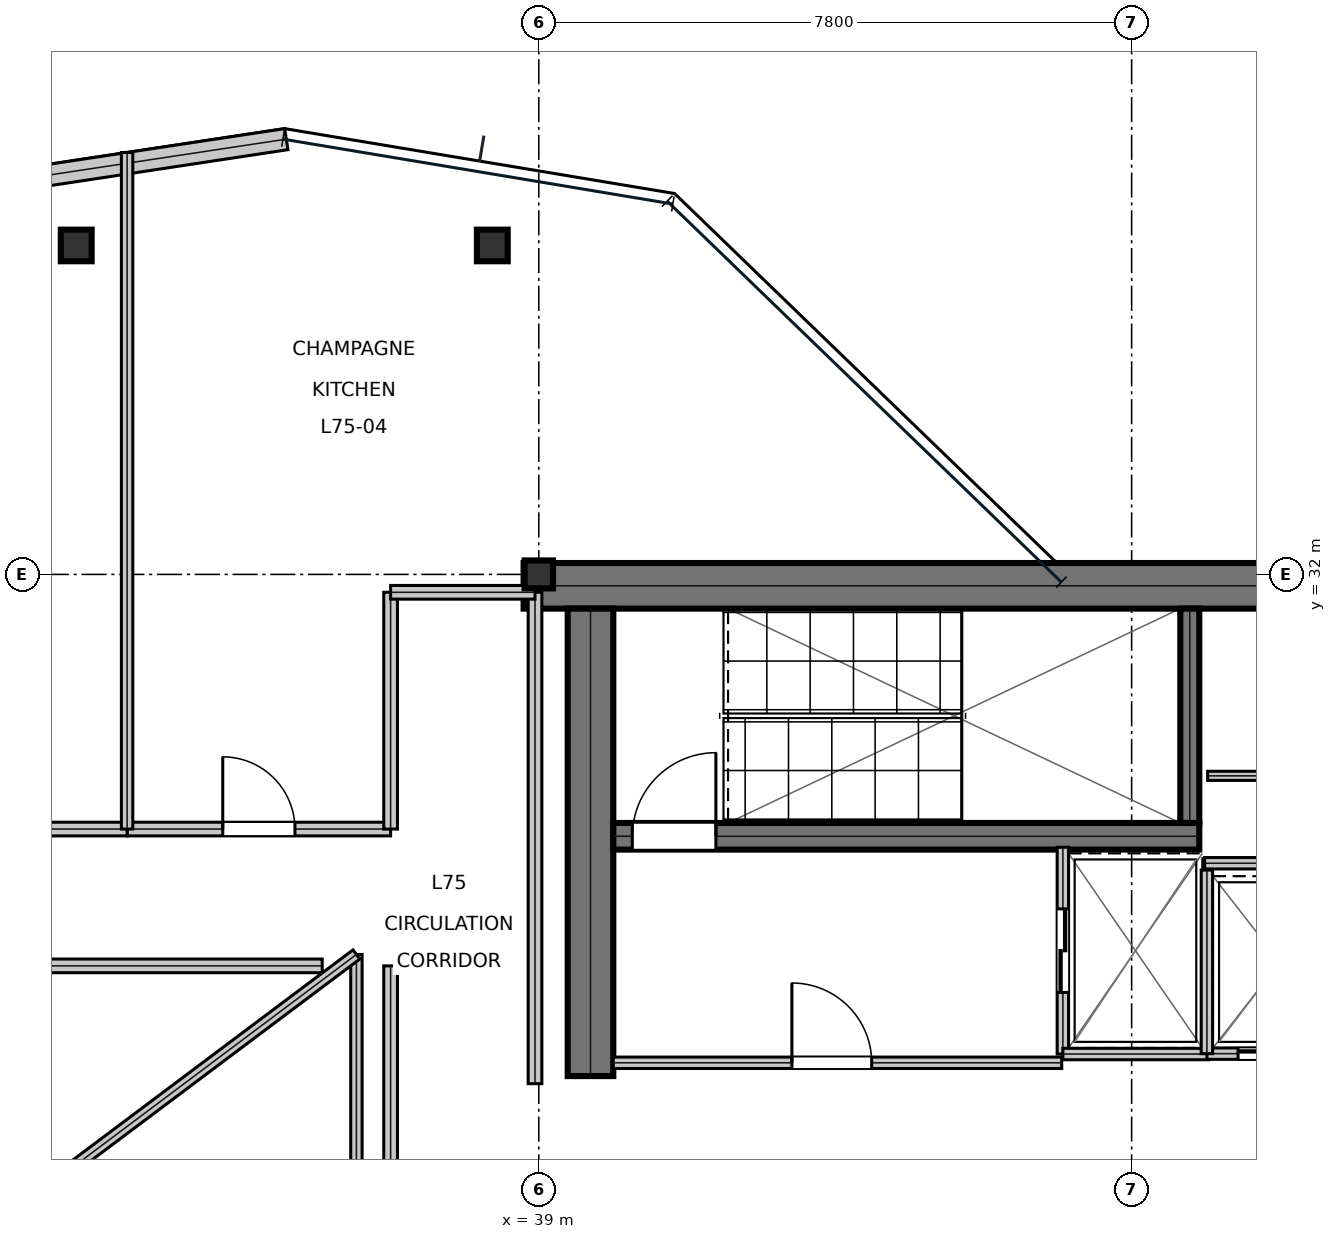
"""IFC4 building model, lengths in metres.
Left out: names, types, materials, properties, quantities, classifications, styles, units other than length and angle.
Written with IfcOpenShell. Run it as: python <this file> out.ifc"""

import sys

from ifc_helpers import new_model, si_unit, direction, frame, frame_2d, origin, origin_2d, place, context, subcontext, project, spatial, rectangle, i_section, extrude, element, fill, save


model = new_model("IFC4")
c1 = context("Model", 3, precision=1e-05, world=origin(), true_north=direction((0.0, 1.0)))
c2 = subcontext(c1, "Body", "Model", "MODEL_VIEW")
j1 = project(units=[si_unit("LENGTHUNIT", "METRE"), si_unit("PLANEANGLEUNIT", "RADIAN")], contexts=[c1])
p1 = place(None, origin())
s1 = spatial("IfcSite", under=j1, at=p1, CompositionType="ELEMENT")
p2 = place(p1, origin())
s2 = spatial("IfcBuilding", under=s1, at=p2, CompositionType="ELEMENT")
p3 = place(p2, frame((0.0, 0.0, 319.5)))
s3 = spatial("IfcBuildingStorey", under=s2, at=p3, CompositionType="ELEMENT", Elevation=319.5)
p4 = place(p3, frame((38.8, 31.85, 0.0), z_axis=(0.0, 0.0, 1.0), x_axis=(1.0, 0.0, 0.0)))
e1 = element("IfcWall", 1, at=p4, inside=s3, PredefinedType="SHEAR", context=c2, shape_type="SweptSolid", body=[
    extrude(rectangle(XDim=16.0, YDim=0.6, at=frame_2d((8.0, 0.0))), origin(), (0.0, 0.0, 1.0), 3.81),
])
p5 = place(p3, frame((39.68, 25.4, 0.0), z_axis=(0.0, 0.0, 1.0), x_axis=(0.0, 1.0, 0.0)))
e2 = element("IfcWall", 2, at=p5, inside=s3, PredefinedType="SHEAR", context=c2, shape_type="SweptSolid", body=[
    extrude(rectangle(XDim=6.15, YDim=0.6, at=frame_2d((3.075, 0.0))), origin(), (0.0, 0.0, 1.0), 3.81),
])
p6 = place(p3, frame((39.98, 28.555, 0.0), z_axis=(0.0, 0.0, 1.0), x_axis=(1.0, 0.0, 0.0)))
e3 = element("IfcWall", 3, at=p6, inside=s3, PredefinedType="SHEAR", context=c2, shape_type="SweptSolid", body=[
    extrude(rectangle(XDim=7.71, YDim=0.35, at=frame_2d((3.855, 0.0))), origin(), (0.0, 0.0, 1.0), 3.81),
])
p7 = place(p6, frame((0.25, 0.0, 0.0)))
e4 = element("IfcOpeningElement", 4, at=p7, cuts=e3, PredefinedType="OPENING", context=c2, shape_type="SweptSolid", body=[
    extrude(rectangle(XDim=1.1, YDim=2.15, at=frame_2d((0.55, 1.075))), frame((0.0, 0.185, 0.0), z_axis=(0.0, -1.0, 0.0), x_axis=(1.0, 0.0, 0.0)), (0.0, 0.0, 1.0), 0.37),
])
p8 = place(p3, frame((47.565, 28.73, 0.0), z_axis=(0.0, 0.0, 1.0), x_axis=(0.0, 1.0, 0.0)))
e5 = element("IfcWall", 5, at=p8, inside=s3, PredefinedType="SHEAR", context=c2, shape_type="SweptSolid", body=[
    extrude(rectangle(XDim=2.82, YDim=0.25, at=frame_2d((1.41, 0.0))), origin(), (0.0, 0.0, 1.0), 3.81),
])
p9 = place(p3, frame((39.0, 32.0, 0.0), z_axis=(0.0, 0.0, 1.0), x_axis=(1.0, 0.0, 0.0)))
e6 = element("IfcColumn", 6, at=p9, inside=s3, PredefinedType="COLUMN", context=c2, shape_type="SweptSolid", body=[
    extrude(i_section(OverallWidth=0.373, OverallDepth=0.368, WebThickness=0.015, FlangeThickness=0.024, at=origin_2d()), origin(), (0.0, 0.0, 1.0), 4.044),
])
p10 = place(p3, frame((32.914, 36.328, 0.016), z_axis=(0.011176767786, -0.023872118153, 0.999652540554), x_axis=(0.905652571216, 0.424020542249, 0.0)))
e7 = element("IfcColumn", 7, at=p10, inside=s3, PredefinedType="COLUMN", context=c2, shape_type="SweptSolid", body=[
    extrude(i_section(OverallWidth=0.406, OverallDepth=0.416, WebThickness=0.03, FlangeThickness=0.048, at=origin_2d()), origin(), (0.0, 0.0, 1.0), 4.019),
])
p11 = place(p3, frame((38.388, 36.328, 0.016), z_axis=(-0.003948530561, -0.02387342324, 0.999707191516), x_axis=(0.986596715682, -0.163177573841, 0.0)))
e8 = element("IfcColumn", 8, at=p11, inside=s3, PredefinedType="COLUMN", context=c2, shape_type="SweptSolid", body=[
    extrude(i_section(OverallWidth=0.406, OverallDepth=0.416, WebThickness=0.03, FlangeThickness=0.048, at=origin_2d()), origin(), (0.0, 0.0, 1.0), 4.019),
])
p12 = place(p3, frame((35.678, 37.726, 0.0), z_axis=(0.0, 0.0, 1.0), x_axis=(-0.988753702072, -0.149553056265, 0.0)))
e9 = element("IfcWall", 9, at=p12, inside=s3, PredefinedType="STANDARD", context=c2, shape_type="SweptSolid", body=[
    extrude(rectangle(XDim=5.188, YDim=0.28, at=frame_2d((2.594, 0.0))), origin(), (0.0, 0.0, 1.0), 3.81),
])
p13 = place(p3, frame((39.98, 25.575, 0.0), z_axis=(0.0, 0.0, 1.0), x_axis=(1.0, 0.0, 0.0)))
e10 = element("IfcWall", 10, at=p13, inside=s3, PredefinedType="PARTITIONING", context=c2, shape_type="SweptSolid", body=[
    extrude(rectangle(XDim=5.9, YDim=0.15, at=frame_2d((2.95, 0.0))), origin(), (0.0, 0.0, 1.0), 3.81),
])
p14 = place(p13, frame((2.35, 0.0, 0.0)))
e11 = element("IfcOpeningElement", 11, at=p14, cuts=e10, PredefinedType="OPENING", context=c2, shape_type="SweptSolid", body=[
    extrude(rectangle(XDim=1.05, YDim=2.15, at=frame_2d((0.525, 1.075))), frame((0.0, 0.085, 0.0), z_axis=(0.0, -1.0, 0.0), x_axis=(1.0, 0.0, 0.0)), (0.0, 0.0, 1.0), 0.17),
])
p15 = place(p3, frame((45.895, 25.69, 0.0), z_axis=(0.0, 0.0, 1.0), x_axis=(0.0, 1.0, 0.0)))
e12 = element("IfcWall", 12, at=p15, inside=s3, PredefinedType="PARTITIONING", context=c2, shape_type="SweptSolid", body=[
    extrude(rectangle(XDim=2.72, YDim=0.15, at=frame_2d((1.36, 0.0))), origin(), (0.0, 0.0, 1.0), 3.81),
])
p16 = place(p15, frame((0.81, 0.0, 0.0)))
e13 = element("IfcOpeningElement", 13, at=p16, cuts=e12, PredefinedType="OPENING", context=c2, shape_type="SweptSolid", body=[
    extrude(rectangle(XDim=1.1, YDim=2.15, at=frame_2d((0.55, 1.075))), frame((0.0, 0.085, 0.0), z_axis=(0.0, -1.0, 0.0), x_axis=(1.0, 0.0, 0.0)), (0.0, 0.0, 1.0), 0.17),
])
p17 = place(p3, frame((45.895, 25.69, 0.0), z_axis=(0.0, 0.0, 1.0), x_axis=(1.0, 0.0, 0.0)))
e14 = element("IfcWall", 14, at=p17, inside=s3, PredefinedType="PARTITIONING", context=c2, shape_type="SweptSolid", body=[
    extrude(rectangle(XDim=1.915, YDim=0.15, at=frame_2d((0.958, 0.0))), origin(), (0.0, 0.0, 1.0), 3.81),
])
p18 = place(p3, frame((47.79, 25.695, 0.0), z_axis=(0.0, 0.0, 1.0), x_axis=(1.0, 0.0, 0.0)))
e15 = element("IfcWall", 15, at=p18, inside=s3, PredefinedType="PARTITIONING", context=c2, shape_type="SweptSolid", body=[
    extrude(rectangle(XDim=1.92, YDim=0.15, at=frame_2d((0.96, 0.0))), origin(), (0.0, 0.0, 1.0), 3.81),
])
p19 = place(p18, frame((0.41, 0.0, 0.0)))
e16 = element("IfcOpeningElement", 16, at=p19, cuts=e15, PredefinedType="OPENING", context=c2, shape_type="SweptSolid", body=[
    extrude(rectangle(XDim=1.1, YDim=2.15, at=frame_2d((0.55, 1.075))), frame((0.0, 0.085, 0.0), z_axis=(0.0, -1.0, 0.0), x_axis=(1.0, 0.0, 0.0)), (0.0, 0.0, 1.0), 0.17),
])
p20 = place(p3, frame((47.79, 25.695, 0.0), z_axis=(0.0, 0.0, 1.0), x_axis=(0.0, 1.0, 0.0)))
e17 = element("IfcWall", 17, at=p20, inside=s3, PredefinedType="PARTITIONING", context=c2, shape_type="SweptSolid", body=[
    extrude(rectangle(XDim=2.415, YDim=0.15, at=frame_2d((1.208, 0.0))), origin(), (0.0, 0.0, 1.0), 3.81),
])
p21 = place(p3, frame((47.76, 28.2, 0.0), z_axis=(0.0, 0.0, 1.0), x_axis=(1.0, 0.0, 0.0)))
e18 = element("IfcWall", 18, at=p21, inside=s3, PredefinedType="PARTITIONING", context=c2, shape_type="SweptSolid", body=[
    extrude(rectangle(XDim=2.04, YDim=0.15, at=frame_2d((1.02, 0.0))), origin(), (0.0, 0.0, 1.0), 3.81),
])
p22 = place(p3, frame((47.8, 29.35, 0.0), z_axis=(0.0, 0.0, 1.0), x_axis=(1.0, 0.0, 0.0)))
e19 = element("IfcWall", 19, at=p22, inside=s3, PredefinedType="PARTITIONING", context=c2, shape_type="SweptSolid", body=[
    extrude(rectangle(XDim=5.86, YDim=0.12, at=frame_2d((2.93, 0.0))), origin(), (0.0, 0.0, 1.0), 3.81),
])
p23 = place(p22, frame((2.6, 0.0, 0.0)))
e20 = element("IfcOpeningElement", 20, at=p23, cuts=e19, PredefinedType="OPENING", context=c2, shape_type="SweptSolid", body=[
    extrude(rectangle(XDim=0.85, YDim=2.15, at=frame_2d((0.425, 1.075))), frame((0.0, 0.07, 0.0), z_axis=(0.0, -1.0, 0.0), x_axis=(1.0, 0.0, 0.0)), (0.0, 0.0, 1.0), 0.14),
])
p24 = place(p3, frame((37.05, 16.235, 0.0), z_axis=(0.0, 0.0, 1.0), x_axis=(0.0, 1.0, 0.0)))
e21 = element("IfcWall", 21, at=p24, inside=s3, PredefinedType="SOLIDWALL", context=c2, shape_type="SweptSolid", body=[
    extrude(rectangle(XDim=10.615, YDim=0.18, at=frame_2d((5.308, 0.0))), origin(), (0.0, 0.0, 1.0), 2.886),
])
p25 = place(p24, frame((2.852, 0.0, 0.0)))
e22 = element("IfcOpeningElement", 22, at=p25, cuts=e21, PredefinedType="OPENING", context=c2, shape_type="SweptSolid", body=[
    extrude(rectangle(XDim=0.95, YDim=2.15, at=frame_2d((0.475, 1.075))), frame((0.0, 0.1, 0.0), z_axis=(0.0, -1.0, 0.0), x_axis=(1.0, 0.0, 0.0)), (0.0, 0.0, 1.0), 0.2),
])
p26 = place(p3, frame((33.583, 28.65, 0.0), z_axis=(0.0, 0.0, 1.0), x_axis=(1.0, 0.0, 0.0)))
e23 = element("IfcWall", 23, at=p26, inside=s3, PredefinedType="SOLIDWALL", context=c2, shape_type="SweptSolid", body=[
    extrude(rectangle(XDim=3.467, YDim=0.18, at=frame_2d((1.733, 0.0))), origin(), (0.0, 0.0, 1.0), 3.81),
])
p27 = place(p26, frame((1.259, 0.0, 0.0)))
e24 = element("IfcOpeningElement", 24, at=p27, cuts=e23, PredefinedType="OPENING", context=c2, shape_type="SweptSolid", body=[
    extrude(rectangle(XDim=0.95, YDim=2.15, at=frame_2d((0.475, 1.075))), frame((0.0, 0.1, 0.0), z_axis=(0.0, -1.0, 0.0), x_axis=(1.0, 0.0, 0.0)), (0.0, 0.0, 1.0), 0.2),
])
p28 = place(p3, frame((30.25, 26.85, 0.0), z_axis=(0.0, 0.0, 1.0), x_axis=(1.0, 0.0, 0.0)))
e25 = element("IfcWall", 25, at=p28, inside=s3, PredefinedType="SOLIDWALL", context=c2, shape_type="SweptSolid", body=[
    extrude(rectangle(XDim=5.9, YDim=0.18, at=frame_2d((2.95, 0.0))), origin(), (0.0, 0.0, 1.0), 2.886),
])
p29 = place(p3, frame((30.25, 28.65, 0.0), z_axis=(0.0, 0.0, 1.0), x_axis=(1.0, 0.0, 0.0)))
e26 = element("IfcWall", 26, at=p29, inside=s3, PredefinedType="SOLIDWALL", context=c2, shape_type="SweptSolid", body=[
    extrude(rectangle(XDim=3.333, YDim=0.18, at=frame_2d((1.667, 0.0))), origin(), (0.0, 0.0, 1.0), 3.27),
])
p30 = place(p3, frame((38.95, 25.3, 0.0), z_axis=(0.0, 0.0, 1.0), x_axis=(0.0, 1.0, 0.0)))
e27 = element("IfcWall", 27, at=p30, inside=s3, PredefinedType="SOLIDWALL", context=c2, shape_type="SweptSolid", body=[
    extrude(rectangle(XDim=6.465, YDim=0.18, at=frame_2d((3.232, 0.0))), origin(), (0.0, 0.0, 1.0), 2.886),
])
p31 = place(p3, frame((37.05, 28.65, 0.0), z_axis=(0.0, 0.0, 1.0), x_axis=(0.0, 1.0, 0.0)))
e28 = element("IfcWall", 28, at=p31, inside=s3, PredefinedType="SOLIDWALL", context=c2, shape_type="SweptSolid", body=[
    extrude(rectangle(XDim=3.115, YDim=0.18, at=frame_2d((1.558, 0.0))), origin(), (0.0, 0.0, 1.0), 3.54),
])
p32 = place(p3, frame((37.05, 31.765, 0.0), z_axis=(0.0, 0.0, 1.0), x_axis=(1.0, 0.0, 0.0)))
e29 = element("IfcWall", 29, at=p32, inside=s3, PredefinedType="SOLIDWALL", context=c2, shape_type="SweptSolid", body=[
    extrude(rectangle(XDim=1.9, YDim=0.18, at=frame_2d((0.95, 0.0))), origin(), (0.0, 0.0, 1.0), 3.27),
])
p33 = place(p3, frame((33.583, 28.65, 0.0), z_axis=(0.0, 0.0, 1.0), x_axis=(0.0, 1.0, 0.0)))
e30 = element("IfcWall", 30, at=p33, inside=s3, PredefinedType="MOVABLE", context=c2, shape_type="SweptSolid", body=[
    extrude(rectangle(XDim=8.901, YDim=0.15, at=frame_2d((4.451, 0.0))), origin(), (0.0, 0.0, 1.0), 3.27),
])
p34 = place(p3, frame((36.6, 21.0, 0.0), z_axis=(0.0, 0.0, 1.0), x_axis=(0.0, 1.0, 0.0)))
e31 = element("IfcWall", 31, at=p34, inside=s3, PredefinedType="MOVABLE", context=c2, shape_type="SweptSolid", body=[
    extrude(rectangle(XDim=6.0, YDim=0.15, at=frame_2d((3.0, 0.0))), origin(), (0.0, 0.0, 1.0), 2.886),
])
p35 = place(p3, frame((36.6, 27.0, 0.0), z_axis=(0.0, 0.0, 1.0), x_axis=(-0.8, -0.6, 0.0)))
e32 = element("IfcWall", 32, at=p35, inside=s3, PredefinedType="MOVABLE", context=c2, shape_type="SweptSolid", body=[
    extrude(rectangle(XDim=5.0, YDim=0.15, at=frame_2d((2.5, 0.0))), origin(), (0.0, 0.0, 1.0), 2.886),
])
p36 = place(p14, origin())
e33 = element("IfcDoor", 33, at=p36, inside=s3, OperationType="SINGLE_SWING_LEFT", PredefinedType="DOOR", context=c2, shape_type="SweptSolid", body=[
    extrude(rectangle(XDim=1.05, YDim=2.15, at=frame_2d((0.525, 1.075))), frame((0.0, 0.025, 0.0), z_axis=(0.0, -1.0, 0.0), x_axis=(1.0, 0.0, 0.0)), (0.0, 0.0, 1.0), 0.05),
])
fill(e11, e33)
p37 = place(p16, frame((1.1, 0.0, 0.0), z_axis=(0.0, 0.0, 1.0), x_axis=(-1.0, 0.0, 0.0)))
e34 = element("IfcDoor", 34, at=p37, inside=s3, OperationType="DOUBLE_DOOR_SLIDING", PredefinedType="DOOR", context=c2, shape_type="SweptSolid", body=[
    extrude(rectangle(XDim=1.1, YDim=2.15, at=frame_2d((0.55, 1.075))), frame((0.0, 0.025, 0.0), z_axis=(0.0, -1.0, 0.0), x_axis=(1.0, 0.0, 0.0)), (0.0, 0.0, 1.0), 0.05),
])
fill(e13, e34)
p38 = place(p19, frame((1.1, 0.0, 0.0), z_axis=(0.0, 0.0, 1.0), x_axis=(-1.0, 0.0, 0.0)))
e35 = element("IfcDoor", 35, at=p38, inside=s3, OperationType="DOUBLE_DOOR_SLIDING", PredefinedType="DOOR", context=c2, shape_type="SweptSolid", body=[
    extrude(rectangle(XDim=1.1, YDim=2.15, at=frame_2d((0.55, 1.075))), frame((0.0, 0.025, 0.0), z_axis=(0.0, -1.0, 0.0), x_axis=(1.0, 0.0, 0.0)), (0.0, 0.0, 1.0), 0.05),
])
fill(e16, e35)
p39 = place(p27, origin())
e36 = element("IfcDoor", 36, at=p39, inside=s3, OperationType="SINGLE_SWING_LEFT", PredefinedType="DOOR", context=c2, shape_type="SweptSolid", body=[
    extrude(rectangle(XDim=0.95, YDim=2.15, at=frame_2d((0.475, 1.075))), frame((0.0, 0.025, 0.0), z_axis=(0.0, -1.0, 0.0), x_axis=(1.0, 0.0, 0.0)), (0.0, 0.0, 1.0), 0.05),
])
fill(e24, e36)
p40 = place(p7, origin())
e37 = element("IfcDoor", 37, at=p40, inside=s3, OperationType="SINGLE_SWING_RIGHT", PredefinedType="DOOR", context=c2, shape_type="SweptSolid", body=[
    extrude(rectangle(XDim=1.1, YDim=2.15, at=frame_2d((0.55, 1.075))), frame((0.0, 0.025, 0.0), z_axis=(0.0, -1.0, 0.0), x_axis=(1.0, 0.0, 0.0)), (0.0, 0.0, 1.0), 0.05),
])
fill(e4, e37)
save(model, sys.argv[1])
